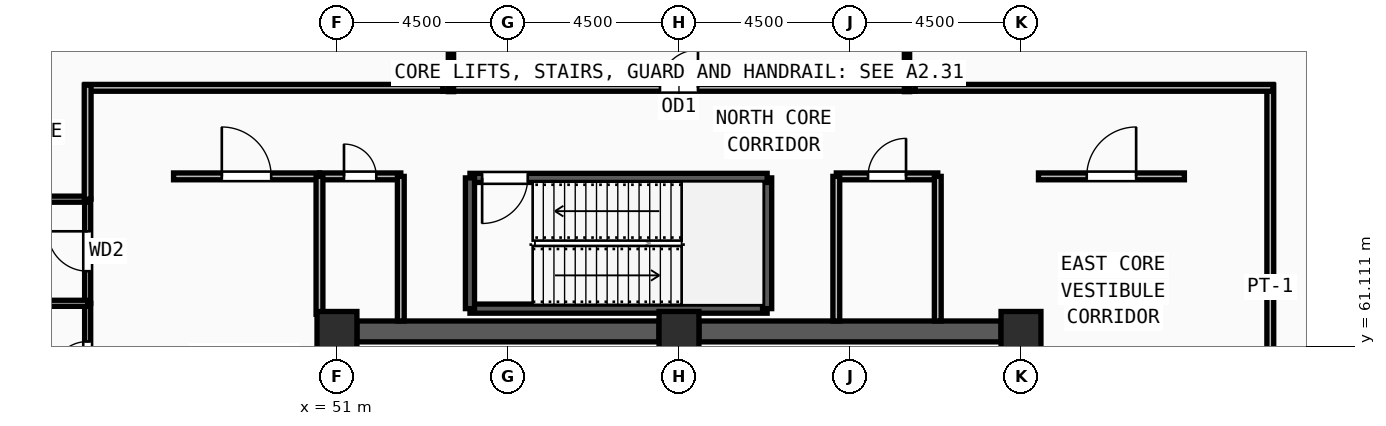
"""IFC4 building model, lengths in metres.
Left out: names, types, materials, properties, quantities, classifications, styles, units other than length and angle.
Written with IfcOpenShell. Run it as: python <this file> out.ifc"""

import sys

from ifc_helpers import new_model, si_unit, direction, frame, frame_2d, origin, origin_2d, place, context, subcontext, project, spatial, rectangle, extrude, source, transform, mapped, element, fill, save


model = new_model("IFC4")
c1 = context("Model", 3, precision=1e-05, world=origin(), true_north=direction((0.0, 1.0)))
c2 = subcontext(c1, "Body", "Model", "MODEL_VIEW")
j1 = project(units=[si_unit("LENGTHUNIT", "METRE"), si_unit("PLANEANGLEUNIT", "RADIAN")], contexts=[c1])
p1 = place(None, origin())
s1 = spatial("IfcSite", under=j1, at=p1, CompositionType="ELEMENT")
p2 = place(p1, origin())
s2 = spatial("IfcBuilding", under=s1, at=p2, CompositionType="ELEMENT")
p3 = place(p2, frame((0.0, 0.0, 355.8)))
s3 = spatial("IfcBuildingStorey", under=s2, at=p3, CompositionType="ELEMENT", Elevation=355.8)
m1 = source(origin(), c2, "Body", "SweptSolid", [
    extrude(rectangle(XDim=1.05, YDim=1.05, at=origin_2d()), origin(), (0.0, 0.0, 1.0), 4.8),
])
for number, where, z_axis, x_axis in (
    (1, (69.0, 61.5, 0.0), (0.0, 0.0, 1.0), (1.0, 0.0, 0.0)),
    (2, (60.0, 61.5, 0.0), (0.0, 0.0, 1.0), (1.0, 0.0, 0.0)),
    (3, (51.0, 61.5, 0.0), (0.0, 0.0, 1.0), (1.0, 0.0, 0.0)),
):
    element("IfcColumn", number, at=place(p3, frame(where, z_axis=z_axis, x_axis=x_axis)), inside=s3, PredefinedType="COLUMN", context=c2, shape_type="MappedRepresentation", body=[
        mapped(m1, transform((0.0, 0.0, 0.0), x_axis=(1.0, 0.0, 0.0), y_axis=(0.0, 1.0, 0.0), z_axis=(0.0, 0.0, 1.0), scale=1.0)),
    ])
for number, where, z_axis, x_axis in (
    (4, (51.525, 61.5, 0.0), (0.0, 0.0, 1.0), (1.0, 0.0, 0.0)),
    (5, (60.525, 61.5, 0.0), (0.0, 0.0, 1.0), (1.0, 0.0, 0.0)),
):
    element("IfcWall", number, at=place(p3, frame(where, z_axis=z_axis, x_axis=x_axis)), inside=s3, PredefinedType="SHEAR", context=c2, shape_type="SweptSolid", body=[
        extrude(rectangle(XDim=7.95, YDim=0.55, at=frame_2d((3.975, 0.0))), origin(), (0.0, 0.0, 1.0), 4.35),
    ])
p4 = place(p3, frame((54.5, 62.1, 0.0), z_axis=(0.0, 0.0, 1.0), x_axis=(1.0, 0.0, 0.0)))
e6 = element("IfcWall", 6, at=p4, inside=s3, PredefinedType="SOLIDWALL", context=c2, shape_type="SweptSolid", body=[
    extrude(rectangle(XDim=7.82, YDim=0.24, at=frame_2d((3.91, 0.0))), origin(), (0.0, 0.0, 1.0), 4.35),
])
p5 = place(p3, frame((62.32, 62.1, 0.0), z_axis=(0.0, 0.0, 1.0), x_axis=(0.0, 1.0, 0.0)))
e7 = element("IfcWall", 7, at=p5, inside=s3, PredefinedType="SOLIDWALL", context=c2, shape_type="SweptSolid", body=[
    extrude(rectangle(XDim=3.44, YDim=0.24, at=frame_2d((1.72, 0.0))), origin(), (0.0, 0.0, 1.0), 4.35),
])
p6 = place(p3, frame((62.32, 65.54, 0.0), z_axis=(0.0, 0.0, 1.0), x_axis=(-1.0, 0.0, 0.0)))
e8 = element("IfcWall", 8, at=p6, inside=s3, PredefinedType="SOLIDWALL", context=c2, shape_type="SweptSolid", body=[
    extrude(rectangle(XDim=7.82, YDim=0.24, at=frame_2d((3.91, 0.0))), origin(), (0.0, 0.0, 1.0), 4.35),
])
m2 = source(origin(), c2, "Body", "SweptSolid", [
    extrude(rectangle(XDim=1.2, YDim=2.2, at=frame_2d((0.6, 1.1))), frame((0.0, 0.13, 0.0), z_axis=(0.0, -1.0, 0.0), x_axis=(1.0, 0.0, 0.0)), (0.0, 0.0, 1.0), 0.26),
])
p7 = place(p6, frame((6.3, 0.0, 0.0)))
e9 = element("IfcOpeningElement", 9, at=p7, cuts=e8, PredefinedType="OPENING", context=c2, shape_type="MappedRepresentation", body=[
    mapped(m2, transform((0.0, 0.0, 0.0), x_axis=(1.0, 0.0, 0.0), y_axis=(0.0, 1.0, 0.0), z_axis=(0.0, 0.0, 1.0), scale=1.0)),
])
p8 = place(p3, frame((54.5, 65.54, 0.0), z_axis=(0.0, 0.0, 1.0), x_axis=(0.0, -1.0, 0.0)))
e10 = element("IfcWall", 10, at=p8, inside=s3, PredefinedType="SOLIDWALL", context=c2, shape_type="SweptSolid", body=[
    extrude(rectangle(XDim=3.44, YDim=0.24, at=frame_2d((1.72, 0.0))), origin(), (0.0, 0.0, 1.0), 4.35),
])
p9 = place(p3, frame((44.44, 59.28, 0.0), z_axis=(0.0, 0.0, 1.0), x_axis=(0.0, 1.0, 0.0)))
e11 = element("IfcWall", 11, at=p9, inside=s3, PredefinedType="PARTITIONING", context=c2, shape_type="SweptSolid", body=[
    extrude(rectangle(XDim=2.96, YDim=0.16, at=frame_2d((1.48, 0.0))), origin(), (0.0, 0.0, 1.0), 4.35),
])
m3 = source(origin(), c2, "Body", "SweptSolid", [
    extrude(rectangle(XDim=0.95, YDim=2.15, at=frame_2d((0.475, 1.075))), frame((0.0, 0.09, 0.0), z_axis=(0.0, -1.0, 0.0), x_axis=(1.0, 0.0, 0.0)), (0.0, 0.0, 1.0), 0.18),
])
p10 = place(p9, frame((1.005, 0.0, 0.0)))
e12 = element("IfcOpeningElement", 12, at=p10, cuts=e11, PredefinedType="OPENING", context=c2, shape_type="MappedRepresentation", body=[
    mapped(m3, transform((0.0, 0.0, 0.0), x_axis=(1.0, 0.0, 0.0), y_axis=(0.0, 1.0, 0.0), z_axis=(0.0, 0.0, 1.0), scale=1.0)),
])
p11 = place(p3, frame((44.44, 62.24, 0.0), z_axis=(0.0, 0.0, 1.0), x_axis=(0.0, 1.0, 0.0)))
e13 = element("IfcWall", 13, at=p11, inside=s3, PredefinedType="PARTITIONING", context=c2, shape_type="SweptSolid", body=[
    extrude(rectangle(XDim=2.74, YDim=0.16, at=frame_2d((1.37, 0.0))), origin(), (0.0, 0.0, 1.0), 4.35),
])
m4 = source(origin(), c2, "Body", "SweptSolid", [
    extrude(rectangle(XDim=1.05, YDim=2.15, at=frame_2d((0.525, 1.075))), frame((0.0, 0.09, 0.0), z_axis=(0.0, -1.0, 0.0), x_axis=(1.0, 0.0, 0.0)), (0.0, 0.0, 1.0), 0.18),
])
p12 = place(p11, frame((0.845, 0.0, 0.0)))
e14 = element("IfcOpeningElement", 14, at=p12, cuts=e13, PredefinedType="OPENING", context=c2, shape_type="MappedRepresentation", body=[
    mapped(m4, transform((0.0, 0.0, 0.0), x_axis=(1.0, 0.0, 0.0), y_axis=(0.0, 1.0, 0.0), z_axis=(0.0, 0.0, 1.0), scale=1.0)),
])
p13 = place(p3, frame((50.54, 65.58, 0.0), z_axis=(0.0, 0.0, 1.0), x_axis=(1.0, 0.0, 0.0)))
e15 = element("IfcWall", 15, at=p13, inside=s3, PredefinedType="PARTITIONING", context=c2, shape_type="SweptSolid", body=[
    extrude(rectangle(XDim=2.14, YDim=0.18, at=frame_2d((1.07, 0.0))), origin(), (0.0, 0.0, 1.0), 4.35),
])
m5 = source(origin(), c2, "Body", "SweptSolid", [
    extrude(rectangle(XDim=0.85, YDim=2.1, at=frame_2d((0.425, 1.05))), frame((0.0, 0.1, 0.0), z_axis=(0.0, -1.0, 0.0), x_axis=(1.0, 0.0, 0.0)), (0.0, 0.0, 1.0), 0.2),
])
p14 = place(p13, frame((0.645, 0.0, 0.0)))
e16 = element("IfcOpeningElement", 16, at=p14, cuts=e15, PredefinedType="OPENING", context=c2, shape_type="MappedRepresentation", body=[
    mapped(m5, transform((0.0, 0.0, 0.0), x_axis=(1.0, 0.0, 0.0), y_axis=(0.0, 1.0, 0.0), z_axis=(0.0, 0.0, 1.0), scale=1.0)),
])
p15 = place(p3, frame((64.14, 65.58, 0.0), z_axis=(0.0, 0.0, 1.0), x_axis=(1.0, 0.0, 0.0)))
e17 = element("IfcWall", 17, at=p15, inside=s3, PredefinedType="PARTITIONING", context=c2, shape_type="SweptSolid", body=[
    extrude(rectangle(XDim=2.67, YDim=0.18, at=frame_2d((1.335, 0.0))), origin(), (0.0, 0.0, 1.0), 4.35),
])
m6 = source(origin(), c2, "Body", "SweptSolid", [
    extrude(rectangle(XDim=1.0, YDim=2.2, at=frame_2d((0.5, 1.1))), frame((0.0, 0.1, 0.0), z_axis=(0.0, -1.0, 0.0), x_axis=(1.0, 0.0, 0.0)), (0.0, 0.0, 1.0), 0.2),
])
p16 = place(p15, frame((0.835, 0.0, 0.0)))
e18 = element("IfcOpeningElement", 18, at=p16, cuts=e17, PredefinedType="OPENING", context=c2, shape_type="MappedRepresentation", body=[
    mapped(m6, transform((0.0, 0.0, 0.0), x_axis=(1.0, 0.0, 0.0), y_axis=(0.0, 1.0, 0.0), z_axis=(0.0, 0.0, 1.0), scale=1.0)),
])
p17 = place(p3, frame((46.7, 65.58, 0.0), z_axis=(0.0, 0.0, 1.0), x_axis=(1.0, 0.0, 0.0)))
e19 = element("IfcWall", 19, at=p17, inside=s3, PredefinedType="PARTITIONING", context=c2, shape_type="SweptSolid", body=[
    extrude(rectangle(XDim=3.84, YDim=0.18, at=frame_2d((1.92, 0.0))), origin(), (0.0, 0.0, 1.0), 4.35),
])
m7 = source(origin(), c2, "Body", "SweptSolid", [
    extrude(rectangle(XDim=1.3, YDim=2.2, at=frame_2d((0.65, 1.1))), frame((0.0, 0.1, 0.0), z_axis=(0.0, -1.0, 0.0), x_axis=(1.0, 0.0, 0.0)), (0.0, 0.0, 1.0), 0.2),
])
p18 = place(p17, frame((1.27, 0.0, 0.0)))
e20 = element("IfcOpeningElement", 20, at=p18, cuts=e19, PredefinedType="OPENING", context=c2, shape_type="MappedRepresentation", body=[
    mapped(m7, transform((0.0, 0.0, 0.0), x_axis=(1.0, 0.0, 0.0), y_axis=(0.0, 1.0, 0.0), z_axis=(0.0, 0.0, 1.0), scale=1.0)),
])
p19 = place(p3, frame((69.46, 65.58, 0.0), z_axis=(0.0, 0.0, 1.0), x_axis=(1.0, 0.0, 0.0)))
e21 = element("IfcWall", 21, at=p19, inside=s3, PredefinedType="PARTITIONING", context=c2, shape_type="SweptSolid", body=[
    extrude(rectangle(XDim=3.84, YDim=0.18, at=frame_2d((1.92, 0.0))), origin(), (0.0, 0.0, 1.0), 4.35),
])
p20 = place(p19, frame((1.27, 0.0, 0.0)))
e22 = element("IfcOpeningElement", 22, at=p20, cuts=e21, PredefinedType="OPENING", context=c2, shape_type="MappedRepresentation", body=[
    mapped(m7, transform((0.0, 0.0, 0.0), x_axis=(1.0, 0.0, 0.0), y_axis=(0.0, 1.0, 0.0), z_axis=(0.0, 0.0, 1.0), scale=1.0)),
])
p21 = place(p3, frame((75.56, 67.98, 0.0), z_axis=(0.0, 0.0, 1.0), x_axis=(0.0, -1.0, 0.0)))
e23 = element("IfcWall", 23, at=p21, inside=s3, PredefinedType="PARTITIONING", context=c2, shape_type="SweptSolid", body=[
    extrude(rectangle(XDim=23.195, YDim=0.18, at=frame_2d((11.598, 0.0))), origin(), (0.0, 0.0, 1.0), 4.35),
])
m8 = source(origin(), c2, "Body", "SweptSolid", [
    extrude(rectangle(XDim=1.5, YDim=2.2, at=frame_2d((0.75, 1.1))), frame((0.0, 0.1, 0.0), z_axis=(0.0, -1.0, 0.0), x_axis=(1.0, 0.0, 0.0)), (0.0, 0.0, 1.0), 0.2),
])
p22 = place(p21, frame((10.848, 0.0, 0.0)))
e24 = element("IfcOpeningElement", 24, at=p22, cuts=e23, PredefinedType="OPENING", context=c2, shape_type="MappedRepresentation", body=[
    mapped(m8, transform((0.0, 0.0, 0.0), x_axis=(1.0, 0.0, 0.0), y_axis=(0.0, 1.0, 0.0), z_axis=(0.0, 0.0, 1.0), scale=1.0)),
])
p23 = place(p3, frame((53.785, 67.91, 0.0), z_axis=(0.0, 0.0, 1.0), x_axis=(1.0, 0.0, 0.0)))
e25 = element("IfcWall", 25, at=p23, inside=s3, PredefinedType="PARTITIONING", context=c2, shape_type="SweptSolid", body=[
    extrude(rectangle(XDim=12.43, YDim=0.18, at=frame_2d((6.215, 0.0))), origin(), (0.0, 0.0, 1.0), 4.35),
])
p24 = place(p23, frame((5.715, 0.0, 0.0)))
e26 = element("IfcOpeningElement", 26, at=p24, cuts=e25, PredefinedType="OPENING", context=c2, shape_type="MappedRepresentation", body=[
    mapped(m6, transform((0.0, 0.0, 0.0), x_axis=(1.0, 0.0, 0.0), y_axis=(0.0, 1.0, 0.0), z_axis=(0.0, 0.0, 1.0), scale=1.0)),
])
for number, where, z_axis, x_axis in (
    (27, (39.98, 62.24, 0.0), (0.0, 0.0, 1.0), (1.0, 0.0, 0.0)),
    (28, (39.98, 64.98, 0.0), (0.0, 0.0, 1.0), (1.0, 0.0, 0.0)),
):
    element("IfcWall", number, at=place(p3, frame(where, z_axis=z_axis, x_axis=x_axis)), inside=s3, PredefinedType="PARTITIONING", context=c2, shape_type="SweptSolid", body=[
        extrude(rectangle(XDim=4.46, YDim=0.16, at=frame_2d((2.23, 0.0))), origin(), (0.0, 0.0, 1.0), 4.35),
    ])
p25 = place(p3, frame((50.54, 61.95, 0.0), z_axis=(0.0, 0.0, 1.0), x_axis=(0.0, 1.0, 0.0)))
e29 = element("IfcWall", 29, at=p25, inside=s3, PredefinedType="PARTITIONING", context=c2, shape_type="SweptSolid", body=[
    extrude(rectangle(XDim=3.63, YDim=0.18, at=frame_2d((1.815, 0.0))), origin(), (0.0, 0.0, 1.0), 4.35),
])
for number, where, z_axis, x_axis in (
    (30, (52.68, 61.775, 0.0), (0.0, 0.0, 1.0), (0.0, 1.0, 0.0)),
    (31, (64.14, 61.775, 0.0), (0.0, 0.0, 1.0), (0.0, 1.0, 0.0)),
    (32, (66.81, 61.775, 0.0), (0.0, 0.0, 1.0), (0.0, 1.0, 0.0)),
):
    element("IfcWall", number, at=place(p3, frame(where, z_axis=z_axis, x_axis=x_axis)), inside=s3, PredefinedType="PARTITIONING", context=c2, shape_type="SweptSolid", body=[
        extrude(rectangle(XDim=3.805, YDim=0.18, at=frame_2d((1.903, 0.0))), origin(), (0.0, 0.0, 1.0), 4.35),
    ])
for number, where, z_axis, x_axis in (
    (33, (66.215, 67.91, 0.0), (0.0, 0.0, 1.0), (1.0, 0.0, 0.0)),
    (34, (44.37, 67.91, 0.0), (0.0, 0.0, 1.0), (1.0, 0.0, 0.0)),
):
    element("IfcWall", number, at=place(p3, frame(where, z_axis=z_axis, x_axis=x_axis)), inside=s3, PredefinedType="PARTITIONING", context=c2, shape_type="SweptSolid", body=[
        extrude(rectangle(XDim=9.415, YDim=0.18, at=frame_2d((4.708, 0.0))), origin(), (0.0, 0.0, 1.0), 4.35),
    ])
p26 = place(p3, frame((44.44, 64.98, 0.0), z_axis=(0.0, 0.0, 1.0), x_axis=(0.0, 1.0, 0.0)))
e35 = element("IfcWall", 35, at=p26, inside=s3, PredefinedType="PARTITIONING", context=c2, shape_type="SweptSolid", body=[
    extrude(rectangle(XDim=3.0, YDim=0.18, at=frame_2d((1.5, 0.0))), origin(), (0.0, 0.0, 1.0), 4.35),
])
p27 = place(p3, frame((54.0, 67.81, 0.0), z_axis=(0.0, 0.0, 1.0), x_axis=(0.0, 1.0, 0.0)))
e36 = element("IfcWall", 36, at=p27, inside=s3, PredefinedType="PARTITIONING", context=c2, shape_type="SweptSolid", body=[
    extrude(rectangle(XDim=7.26, YDim=0.14, at=frame_2d((3.63, 0.0))), origin(), (0.0, 0.0, 1.0), 4.35),
])
p28 = place(p3, frame((66.0, 67.81, 0.0), z_axis=(0.0, 0.0, 1.0), x_axis=(0.0, 1.0, 0.0)))
e37 = element("IfcWall", 37, at=p28, inside=s3, PredefinedType="PARTITIONING", context=c2, shape_type="SweptSolid", body=[
    extrude(rectangle(XDim=7.517, YDim=0.14, at=frame_2d((3.758, 0.0))), origin(), (0.0, 0.0, 1.0), 4.35),
])
m9 = source(origin(), c2, "Body", "SweptSolid", [
    extrude(rectangle(XDim=1.2, YDim=2.2, at=frame_2d((0.6, 1.1))), frame((0.0, 0.025, 0.0), z_axis=(0.0, -1.0, 0.0), x_axis=(1.0, 0.0, 0.0)), (0.0, 0.0, 1.0), 0.05),
])
p29 = place(p7, origin())
e38 = element("IfcDoor", 38, at=p29, inside=s3, OperationType="SINGLE_SWING_RIGHT", PredefinedType="DOOR", context=c2, shape_type="MappedRepresentation", body=[
    mapped(m9, transform((0.0, 0.0, 0.0), x_axis=(1.0, 0.0, 0.0), y_axis=(0.0, 1.0, 0.0), z_axis=(0.0, 0.0, 1.0), scale=1.0)),
])
fill(e9, e38)
m10 = source(origin(), c2, "Body", "SweptSolid", [
    extrude(rectangle(XDim=0.95, YDim=2.15, at=frame_2d((0.475, 1.075))), frame((0.0, 0.025, 0.0), z_axis=(0.0, -1.0, 0.0), x_axis=(1.0, 0.0, 0.0)), (0.0, 0.0, 1.0), 0.05),
])
p30 = place(p10, origin())
e39 = element("IfcDoor", 39, at=p30, inside=s3, OperationType="SINGLE_SWING_LEFT", PredefinedType="DOOR", context=c2, shape_type="MappedRepresentation", body=[
    mapped(m10, transform((0.0, 0.0, 0.0), x_axis=(1.0, 0.0, 0.0), y_axis=(0.0, 1.0, 0.0), z_axis=(0.0, 0.0, 1.0), scale=1.0)),
])
fill(e12, e39)
m11 = source(origin(), c2, "Body", "SweptSolid", [
    extrude(rectangle(XDim=1.05, YDim=2.15, at=frame_2d((0.525, 1.075))), frame((0.0, 0.025, 0.0), z_axis=(0.0, -1.0, 0.0), x_axis=(1.0, 0.0, 0.0)), (0.0, 0.0, 1.0), 0.05),
])
p31 = place(p12, origin())
e40 = element("IfcDoor", 40, at=p31, inside=s3, OperationType="SINGLE_SWING_RIGHT", PredefinedType="DOOR", context=c2, shape_type="MappedRepresentation", body=[
    mapped(m11, transform((0.0, 0.0, 0.0), x_axis=(1.0, 0.0, 0.0), y_axis=(0.0, 1.0, 0.0), z_axis=(0.0, 0.0, 1.0), scale=1.0)),
])
fill(e14, e40)
m12 = source(origin(), c2, "Body", "SweptSolid", [
    extrude(rectangle(XDim=0.85, YDim=2.1, at=frame_2d((0.425, 1.05))), frame((0.0, 0.025, 0.0), z_axis=(0.0, -1.0, 0.0), x_axis=(1.0, 0.0, 0.0)), (0.0, 0.0, 1.0), 0.05),
])
p32 = place(p14, origin())
e41 = element("IfcDoor", 41, at=p32, inside=s3, OperationType="SINGLE_SWING_LEFT", PredefinedType="DOOR", context=c2, shape_type="MappedRepresentation", body=[
    mapped(m12, transform((0.0, 0.0, 0.0), x_axis=(1.0, 0.0, 0.0), y_axis=(0.0, 1.0, 0.0), z_axis=(0.0, 0.0, 1.0), scale=1.0)),
])
fill(e16, e41)
m13 = source(origin(), c2, "Body", "SweptSolid", [
    extrude(rectangle(XDim=1.0, YDim=2.2, at=frame_2d((0.5, 1.1))), frame((0.0, 0.025, 0.0), z_axis=(0.0, -1.0, 0.0), x_axis=(1.0, 0.0, 0.0)), (0.0, 0.0, 1.0), 0.05),
])
p33 = place(p16, origin())
e42 = element("IfcDoor", 42, at=p33, inside=s3, OperationType="SINGLE_SWING_RIGHT", PredefinedType="DOOR", context=c2, shape_type="MappedRepresentation", body=[
    mapped(m13, transform((0.0, 0.0, 0.0), x_axis=(1.0, 0.0, 0.0), y_axis=(0.0, 1.0, 0.0), z_axis=(0.0, 0.0, 1.0), scale=1.0)),
])
fill(e18, e42)
m14 = source(origin(), c2, "Body", "SweptSolid", [
    extrude(rectangle(XDim=1.3, YDim=2.2, at=frame_2d((0.65, 1.1))), frame((0.0, 0.025, 0.0), z_axis=(0.0, -1.0, 0.0), x_axis=(1.0, 0.0, 0.0)), (0.0, 0.0, 1.0), 0.05),
])
p34 = place(p18, origin())
e43 = element("IfcDoor", 43, at=p34, inside=s3, OperationType="SINGLE_SWING_LEFT", PredefinedType="DOOR", context=c2, shape_type="MappedRepresentation", body=[
    mapped(m14, transform((0.0, 0.0, 0.0), x_axis=(1.0, 0.0, 0.0), y_axis=(0.0, 1.0, 0.0), z_axis=(0.0, 0.0, 1.0), scale=1.0)),
])
fill(e20, e43)
p35 = place(p20, origin())
e44 = element("IfcDoor", 44, at=p35, inside=s3, OperationType="SINGLE_SWING_RIGHT", PredefinedType="DOOR", context=c2, shape_type="MappedRepresentation", body=[
    mapped(m14, transform((0.0, 0.0, 0.0), x_axis=(1.0, 0.0, 0.0), y_axis=(0.0, 1.0, 0.0), z_axis=(0.0, 0.0, 1.0), scale=1.0)),
])
fill(e22, e44)
p36 = place(p24, origin())
e45 = element("IfcDoor", 45, at=p36, inside=s3, OperationType="SINGLE_SWING_RIGHT", PredefinedType="DOOR", context=c2, shape_type="MappedRepresentation", body=[
    mapped(m13, transform((0.0, 0.0, 0.0), x_axis=(1.0, 0.0, 0.0), y_axis=(0.0, 1.0, 0.0), z_axis=(0.0, 0.0, 1.0), scale=1.0)),
])
fill(e26, e45)
save(model, sys.argv[1])
